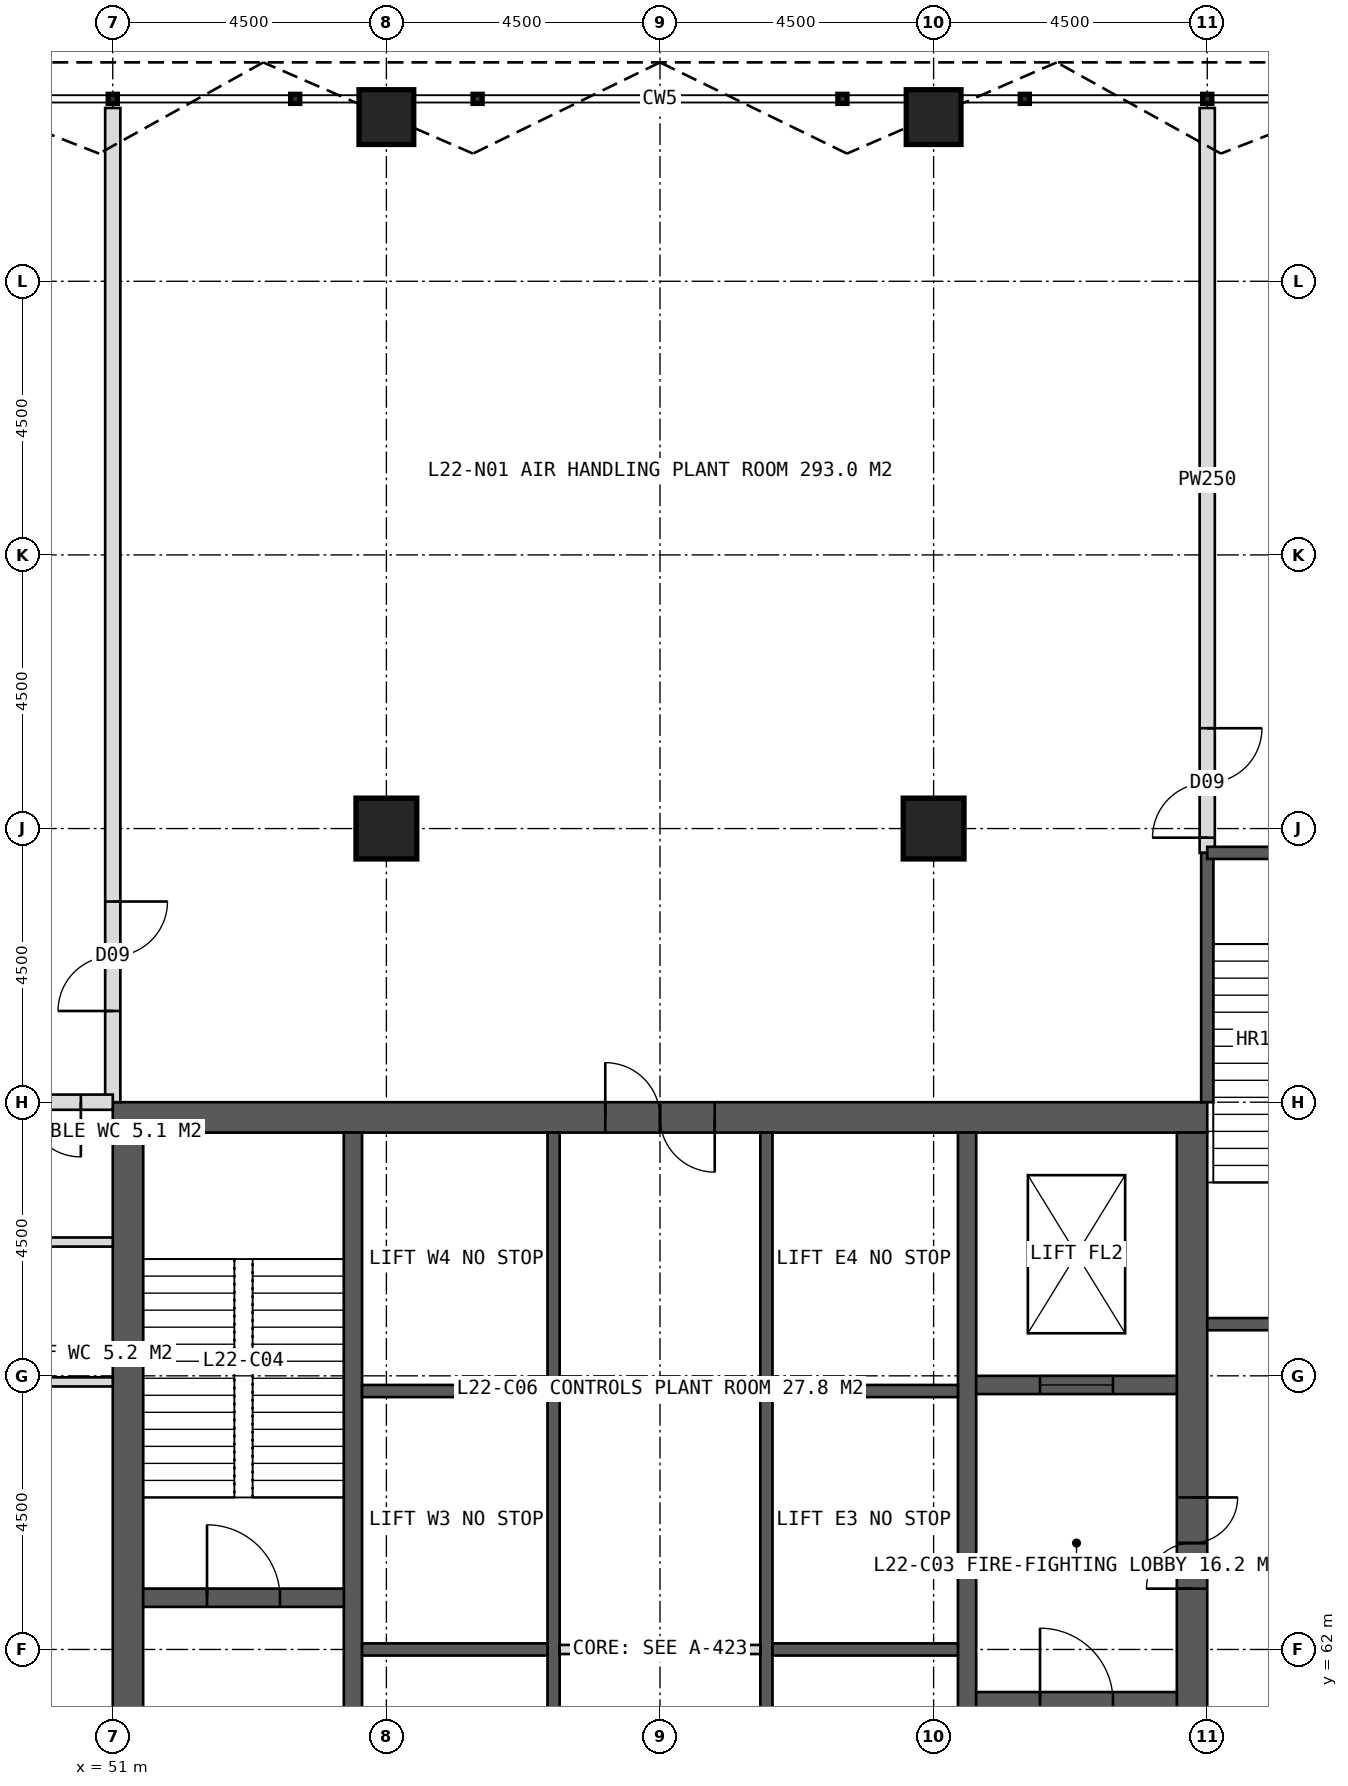
"""IFC4 building model, lengths in metres.
Left out: names, types, materials, properties, quantities, classifications, styles, units other than length and angle.
Written with IfcOpenShell. Run it as: python <this file> out.ifc"""

import sys

from ifc_helpers import new_model, si_unit, direction, frame, frame_2d, origin, origin_2d, place, context, subcontext, project, spatial, rectangle, hollow_rectangle, extrude, element, fill, save


model = new_model("IFC4")
c1 = context("Model", 3, precision=1e-05, world=origin(), true_north=direction((0.0, 1.0)))
c2 = subcontext(c1, "Body", "Model", "MODEL_VIEW")
j1 = project(units=[si_unit("LENGTHUNIT", "METRE"), si_unit("PLANEANGLEUNIT", "RADIAN")], contexts=[c1])
p1 = place(None, origin())
s1 = spatial("IfcSite", under=j1, at=p1, CompositionType="ELEMENT")
p2 = place(p1, origin())
s2 = spatial("IfcBuilding", under=s1, at=p2, CompositionType="ELEMENT")
p3 = place(p2, frame((0.0, 0.0, 95.0)))
s3 = spatial("IfcBuildingStorey", under=s2, at=p3, CompositionType="ELEMENT", Elevation=95.0)
p4 = place(p3, frame((51.0, 70.75, 0.0), z_axis=(0.0, 0.0, 1.0), x_axis=(1.0, 0.0, 0.0)))
e1 = element("IfcWall", 1, at=p4, inside=s3, PredefinedType="SHEAR", context=c2, shape_type="SweptSolid", body=[
    extrude(rectangle(XDim=18.0, YDim=0.5, at=frame_2d((9.0, 0.0))), origin(), (0.0, 0.0, 1.0), 5.0),
])
p5 = place(p4, frame((8.1, 0.0, 0.0)))
e2 = element("IfcOpeningElement", 2, at=p5, cuts=e1, PredefinedType="OPENING", context=c2, shape_type="SweptSolid", body=[
    extrude(rectangle(XDim=1.8, YDim=2.2, at=frame_2d((0.9, 1.1))), frame((0.0, 0.26, 0.0), z_axis=(0.0, -1.0, 0.0), x_axis=(1.0, 0.0, 0.0)), (0.0, 0.0, 1.0), 0.52),
])
p6 = place(p3, frame((51.25, 53.5, 0.0), z_axis=(0.0, 0.0, 1.0), x_axis=(0.0, 1.0, 0.0)))
e3 = element("IfcWall", 3, at=p6, inside=s3, PredefinedType="SHEAR", context=c2, shape_type="SweptSolid", body=[
    extrude(rectangle(XDim=17.0, YDim=0.5, at=frame_2d((8.5, 0.0))), origin(), (0.0, 0.0, 1.0), 5.0),
])
p7 = place(p6, frame((6.0, 0.0, 0.0)))
e4 = element("IfcOpeningElement", 4, at=p7, cuts=e3, PredefinedType="OPENING", context=c2, shape_type="SweptSolid", body=[
    extrude(rectangle(XDim=1.5, YDim=2.2, at=frame_2d((0.75, 1.1))), frame((0.0, 0.26, 0.0), z_axis=(0.0, -1.0, 0.0), x_axis=(1.0, 0.0, 0.0)), (0.0, 0.0, 1.0), 0.52),
])
p8 = place(p3, frame((68.75, 53.5, 0.0), z_axis=(0.0, 0.0, 1.0), x_axis=(0.0, 1.0, 0.0)))
e5 = element("IfcWall", 5, at=p8, inside=s3, PredefinedType="SHEAR", context=c2, shape_type="SweptSolid", body=[
    extrude(rectangle(XDim=17.0, YDim=0.5, at=frame_2d((8.5, 0.0))), origin(), (0.0, 0.0, 1.0), 5.0),
])
p9 = place(p8, frame((9.5, 0.0, 0.0)))
e6 = element("IfcOpeningElement", 6, at=p9, cuts=e5, PredefinedType="OPENING", context=c2, shape_type="SweptSolid", body=[
    extrude(rectangle(XDim=1.5, YDim=2.2, at=frame_2d((0.75, 1.1))), frame((0.0, 0.26, 0.0), z_axis=(0.0, -1.0, 0.0), x_axis=(1.0, 0.0, 0.0)), (0.0, 0.0, 1.0), 0.52),
])
for number, where, z_axis, x_axis in (
    (7, (54.95, 53.5, 0.0), (0.0, 0.0, 1.0), (0.0, 1.0, 0.0)),
    (8, (65.05, 53.5, 0.0), (0.0, 0.0, 1.0), (0.0, 1.0, 0.0)),
):
    element("IfcWall", number, at=place(p3, frame(where, z_axis=z_axis, x_axis=x_axis)), inside=s3, PredefinedType="SHEAR", context=c2, shape_type="SweptSolid", body=[
        extrude(rectangle(XDim=17.0, YDim=0.3, at=frame_2d((8.5, 0.0))), origin(), (0.0, 0.0, 1.0), 5.0),
    ])
for number, where, z_axis, x_axis in (
    (9, (58.25, 53.5, 0.0), (0.0, 0.0, 1.0), (0.0, 1.0, 0.0)),
    (10, (61.75, 53.5, 0.0), (0.0, 0.0, 1.0), (0.0, 1.0, 0.0)),
):
    element("IfcWall", number, at=place(p3, frame(where, z_axis=z_axis, x_axis=x_axis)), inside=s3, PredefinedType="SHEAR", context=c2, shape_type="SweptSolid", body=[
        extrude(rectangle(XDim=17.0, YDim=0.2, at=frame_2d((8.5, 0.0))), origin(), (0.0, 0.0, 1.0), 5.0),
    ])
for number, where, z_axis, x_axis in (
    (11, (55.1, 62.0, 0.0), (0.0, 0.0, 1.0), (1.0, 0.0, 0.0)),
    (12, (61.85, 62.0, 0.0), (0.0, 0.0, 1.0), (1.0, 0.0, 0.0)),
    (13, (55.1, 66.25, 0.0), (0.0, 0.0, 1.0), (1.0, 0.0, 0.0)),
    (14, (61.85, 66.25, 0.0), (0.0, 0.0, 1.0), (1.0, 0.0, 0.0)),
):
    element("IfcWall", number, at=place(p3, frame(where, z_axis=z_axis, x_axis=x_axis)), inside=s3, PredefinedType="SHEAR", context=c2, shape_type="SweptSolid", body=[
        extrude(rectangle(XDim=3.05, YDim=0.2, at=frame_2d((1.525, 0.0))), origin(), (0.0, 0.0, 1.0), 5.0),
    ])
p10 = place(p3, frame((51.5, 62.85, 0.0), z_axis=(0.0, 0.0, 1.0), x_axis=(1.0, 0.0, 0.0)))
e15 = element("IfcWall", 15, at=p10, inside=s3, PredefinedType="SHEAR", context=c2, shape_type="SweptSolid", body=[
    extrude(rectangle(XDim=3.3, YDim=0.3, at=frame_2d((1.65, 0.0))), origin(), (0.0, 0.0, 1.0), 5.0),
])
p11 = place(p10, frame((1.05, 0.0, 0.0)))
e16 = element("IfcOpeningElement", 16, at=p11, cuts=e15, PredefinedType="OPENING", context=c2, shape_type="SweptSolid", body=[
    extrude(rectangle(XDim=1.2, YDim=2.1, at=frame_2d((0.6, 1.05))), frame((0.0, 0.16, 0.0), z_axis=(0.0, -1.0, 0.0), x_axis=(1.0, 0.0, 0.0)), (0.0, 0.0, 1.0), 0.32),
])
p12 = place(p3, frame((65.2, 61.15, 0.0), z_axis=(0.0, 0.0, 1.0), x_axis=(1.0, 0.0, 0.0)))
e17 = element("IfcWall", 17, at=p12, inside=s3, PredefinedType="SHEAR", context=c2, shape_type="SweptSolid", body=[
    extrude(rectangle(XDim=3.3, YDim=0.3, at=frame_2d((1.65, 0.0))), origin(), (0.0, 0.0, 1.0), 5.0),
])
p13 = place(p12, frame((1.05, 0.0, 0.0)))
e18 = element("IfcOpeningElement", 18, at=p13, cuts=e17, PredefinedType="OPENING", context=c2, shape_type="SweptSolid", body=[
    extrude(rectangle(XDim=1.2, YDim=2.1, at=frame_2d((0.6, 1.05))), frame((0.0, 0.16, 0.0), z_axis=(0.0, -1.0, 0.0), x_axis=(1.0, 0.0, 0.0)), (0.0, 0.0, 1.0), 0.32),
])
p14 = place(p3, frame((65.2, 66.35, 0.0), z_axis=(0.0, 0.0, 1.0), x_axis=(1.0, 0.0, 0.0)))
e19 = element("IfcWall", 19, at=p14, inside=s3, PredefinedType="SHEAR", context=c2, shape_type="SweptSolid", body=[
    extrude(rectangle(XDim=3.3, YDim=0.3, at=frame_2d((1.65, 0.0))), origin(), (0.0, 0.0, 1.0), 5.0),
])
p15 = place(p14, frame((1.05, 0.0, 0.0)))
e20 = element("IfcOpeningElement", 20, at=p15, cuts=e19, PredefinedType="OPENING", context=c2, shape_type="SweptSolid", body=[
    extrude(rectangle(XDim=1.2, YDim=2.2, at=frame_2d((0.6, 1.1))), frame((0.0, 0.16, 0.0), z_axis=(0.0, -1.0, 0.0), x_axis=(1.0, 0.0, 0.0)), (0.0, 0.0, 1.0), 0.32),
])
for number, where, z_axis, x_axis in (
    (21, (55.5, 75.5, 0.0), (0.0, 0.0, 1.0), (1.0, 0.0, 0.0)),
    (22, (64.5, 75.5, 0.0), (0.0, 0.0, 1.0), (1.0, 0.0, 0.0)),
):
    element("IfcColumn", number, at=place(p3, frame(where, z_axis=z_axis, x_axis=x_axis)), inside=s3, PredefinedType="COLUMN", context=c2, shape_type="SweptSolid", body=[
        extrude(hollow_rectangle(XDim=1.0, YDim=1.0, WallThickness=0.1, at=origin_2d()), origin(), (0.0, 0.0, 1.0), 5.0),
    ])
for number, where, z_axis, x_axis in (
    (23, (55.5, 87.2, 0.0), (0.0, 0.0, 1.0), (1.0, 0.0, 0.0)),
    (24, (64.5, 87.2, 0.0), (0.0, 0.0, 1.0), (1.0, 0.0, 0.0)),
):
    element("IfcColumn", number, at=place(p3, frame(where, z_axis=z_axis, x_axis=x_axis)), inside=s3, PredefinedType="COLUMN", context=c2, shape_type="SweptSolid", body=[
        extrude(hollow_rectangle(XDim=0.9, YDim=0.9, WallThickness=0.08, at=origin_2d()), origin(), (0.0, 0.0, 1.0), 5.0),
    ])
p16 = place(p3, frame((69.0, 75.1, 0.0), z_axis=(0.0, 0.0, 1.0), x_axis=(0.0, 1.0, 0.0)))
e25 = element("IfcWall", 25, at=p16, inside=s3, PredefinedType="SOLIDWALL", context=c2, shape_type="SweptSolid", body=[
    extrude(rectangle(XDim=12.25, YDim=0.25, at=frame_2d((6.125, 0.0))), origin(), (0.0, 0.0, 1.0), 4.75),
])
p17 = place(p16, frame((0.25, 0.0, 0.0)))
e26 = element("IfcOpeningElement", 26, at=p17, cuts=e25, PredefinedType="OPENING", context=c2, shape_type="SweptSolid", body=[
    extrude(rectangle(XDim=1.8, YDim=2.2, at=frame_2d((0.9, 1.1))), frame((0.0, 0.135, 0.0), z_axis=(0.0, -1.0, 0.0), x_axis=(1.0, 0.0, 0.0)), (0.0, 0.0, 1.0), 0.27),
])
p18 = place(p3, frame((51.0, 71.0, 0.0), z_axis=(0.0, 0.0, 1.0), x_axis=(0.0, 1.0, 0.0)))
e27 = element("IfcWall", 27, at=p18, inside=s3, PredefinedType="SOLIDWALL", context=c2, shape_type="SweptSolid", body=[
    extrude(rectangle(XDim=16.35, YDim=0.25, at=frame_2d((8.175, 0.0))), origin(), (0.0, 0.0, 1.0), 4.75),
])
p19 = place(p18, frame((1.5, 0.0, 0.0)))
e28 = element("IfcOpeningElement", 28, at=p19, cuts=e27, PredefinedType="OPENING", context=c2, shape_type="SweptSolid", body=[
    extrude(rectangle(XDim=1.8, YDim=2.2, at=frame_2d((0.9, 1.1))), frame((0.0, 0.135, 0.0), z_axis=(0.0, -1.0, 0.0), x_axis=(1.0, 0.0, 0.0)), (0.0, 0.0, 1.0), 0.27),
])
p20 = place(p3, frame((51.0, 71.0, 0.0), z_axis=(0.0, 0.0, 1.0), x_axis=(-1.0, 0.0, 0.0)))
e29 = element("IfcWall", 29, at=p20, inside=s3, PredefinedType="SOLIDWALL", context=c2, shape_type="SweptSolid", body=[
    extrude(rectangle(XDim=16.35, YDim=0.25, at=frame_2d((8.175, 0.0))), origin(), (0.0, 0.0, 1.0), 4.75),
])
p21 = place(p20, frame((0.525, 0.0, 0.0)))
e30 = element("IfcOpeningElement", 30, at=p21, cuts=e29, PredefinedType="OPENING", context=c2, shape_type="SweptSolid", body=[
    extrude(rectangle(XDim=1.8, YDim=2.2, at=frame_2d((0.9, 1.1))), frame((0.0, 0.135, 0.0), z_axis=(0.0, -1.0, 0.0), x_axis=(1.0, 0.0, 0.0)), (0.0, 0.0, 1.0), 0.27),
])
p22 = place(p3, frame((51.0, 66.4, 0.0), z_axis=(0.0, 0.0, 1.0), x_axis=(-1.0, 0.0, 0.0)))
e31 = element("IfcWall", 31, at=p22, inside=s3, PredefinedType="PARTITIONING", context=c2, shape_type="SweptSolid", body=[
    extrude(rectangle(XDim=2.5, YDim=0.15, at=frame_2d((1.25, 0.0))), origin(), (0.0, 0.0, 1.0), 3.25),
])
p23 = place(p3, frame((51.0, 68.7, 0.0), z_axis=(0.0, 0.0, 1.0), x_axis=(-1.0, 0.0, 0.0)))
e32 = element("IfcWall", 32, at=p23, inside=s3, PredefinedType="PARTITIONING", context=c2, shape_type="SweptSolid", body=[
    extrude(rectangle(XDim=2.5, YDim=0.15, at=frame_2d((1.25, 0.0))), origin(), (0.0, 0.0, 1.0), 4.75),
])
p24 = place(p3, frame((58.35, 62.0, 0.0), z_axis=(0.0, 0.0, 1.0), x_axis=(1.0, 0.0, 0.0)))
e33 = element("IfcWall", 33, at=p24, inside=s3, PredefinedType="PARTITIONING", context=c2, shape_type="SweptSolid", body=[
    extrude(rectangle(XDim=3.3, YDim=0.15, at=frame_2d((1.65, 0.0))), origin(), (0.0, 0.0, 1.0), 4.75),
])
p25 = place(p3, frame((69.0, 71.0, 0.0), z_axis=(0.0, 0.0, 1.0), x_axis=(0.0, 1.0, 0.0)))
e34 = element("IfcWall", 34, at=p25, inside=s3, PredefinedType="SOLIDWALL", context=c2, shape_type="SweptSolid", body=[
    extrude(rectangle(XDim=4.1, YDim=0.2, at=frame_2d((2.05, 0.0))), origin(), (0.0, 0.0, 1.0), 4.75),
])
p26 = place(p3, frame((69.0, 67.35, 0.0), z_axis=(0.0, 0.0, 1.0), x_axis=(1.0, 0.0, 0.0)))
e35 = element("IfcWall", 35, at=p26, inside=s3, PredefinedType="SOLIDWALL", context=c2, shape_type="SweptSolid", body=[
    extrude(rectangle(XDim=3.5, YDim=0.2, at=frame_2d((1.75, 0.0))), origin(), (0.0, 0.0, 1.0), 4.75),
])
p27 = place(p3, frame((69.0, 75.1, 0.0), z_axis=(0.0, 0.0, 1.0), x_axis=(1.0, 0.0, 0.0)))
e36 = element("IfcWall", 36, at=p27, inside=s3, PredefinedType="SOLIDWALL", context=c2, shape_type="SweptSolid", body=[
    extrude(rectangle(XDim=3.5, YDim=0.2, at=frame_2d((1.75, 0.0))), origin(), (0.0, 0.0, 1.0), 4.75),
])
p28 = place(p27, frame((1.15, 0.0, 0.0)))
e37 = element("IfcOpeningElement", 37, at=p28, cuts=e36, PredefinedType="OPENING", context=c2, shape_type="SweptSolid", body=[
    extrude(rectangle(XDim=1.2, YDim=2.1, at=frame_2d((0.6, 1.05))), frame((0.0, 0.11, 0.0), z_axis=(0.0, -1.0, 0.0), x_axis=(1.0, 0.0, 0.0)), (0.0, 0.0, 1.0), 0.22),
])
p29 = place(p17, origin())
e38 = element("IfcDoor", 38, at=p29, inside=s3, OperationType="DOUBLE_DOOR_SINGLE_SWING", PredefinedType="DOOR", context=c2, shape_type="SweptSolid", body=[
    extrude(rectangle(XDim=1.8, YDim=2.2, at=frame_2d((0.9, 1.1))), frame((0.0, 0.025, 0.0), z_axis=(0.0, -1.0, 0.0), x_axis=(1.0, 0.0, 0.0)), (0.0, 0.0, 1.0), 0.05),
])
fill(e26, e38)
p30 = place(p19, origin())
e39 = element("IfcDoor", 39, at=p30, inside=s3, OperationType="DOUBLE_DOOR_SINGLE_SWING", PredefinedType="DOOR", context=c2, shape_type="SweptSolid", body=[
    extrude(rectangle(XDim=1.8, YDim=2.2, at=frame_2d((0.9, 1.1))), frame((0.0, 0.025, 0.0), z_axis=(0.0, -1.0, 0.0), x_axis=(1.0, 0.0, 0.0)), (0.0, 0.0, 1.0), 0.05),
])
fill(e28, e39)
p31 = place(p21, origin())
e40 = element("IfcDoor", 40, at=p31, inside=s3, OperationType="DOUBLE_DOOR_SINGLE_SWING", PredefinedType="DOOR", context=c2, shape_type="SweptSolid", body=[
    extrude(rectangle(XDim=1.8, YDim=2.2, at=frame_2d((0.9, 1.1))), frame((0.0, 0.025, 0.0), z_axis=(0.0, -1.0, 0.0), x_axis=(1.0, 0.0, 0.0)), (0.0, 0.0, 1.0), 0.05),
])
fill(e30, e40)
p32 = place(p9, origin())
e41 = element("IfcDoor", 41, at=p32, inside=s3, OperationType="DOUBLE_DOOR_SINGLE_SWING", PredefinedType="DOOR", context=c2, shape_type="SweptSolid", body=[
    extrude(rectangle(XDim=1.5, YDim=2.2, at=frame_2d((0.75, 1.1))), frame((0.0, 0.025, 0.0), z_axis=(0.0, -1.0, 0.0), x_axis=(1.0, 0.0, 0.0)), (0.0, 0.0, 1.0), 0.05),
])
fill(e6, e41)
p33 = place(p11, origin())
e42 = element("IfcDoor", 42, at=p33, inside=s3, OperationType="SINGLE_SWING_LEFT", PredefinedType="DOOR", context=c2, shape_type="SweptSolid", body=[
    extrude(rectangle(XDim=1.2, YDim=2.1, at=frame_2d((0.6, 1.05))), frame((0.0, 0.025, 0.0), z_axis=(0.0, -1.0, 0.0), x_axis=(1.0, 0.0, 0.0)), (0.0, 0.0, 1.0), 0.05),
])
fill(e16, e42)
p34 = place(p13, origin())
e43 = element("IfcDoor", 43, at=p34, inside=s3, OperationType="SINGLE_SWING_LEFT", PredefinedType="DOOR", context=c2, shape_type="SweptSolid", body=[
    extrude(rectangle(XDim=1.2, YDim=2.1, at=frame_2d((0.6, 1.05))), frame((0.0, 0.025, 0.0), z_axis=(0.0, -1.0, 0.0), x_axis=(1.0, 0.0, 0.0)), (0.0, 0.0, 1.0), 0.05),
])
fill(e18, e43)
p35 = place(p15, origin())
e44 = element("IfcDoor", 44, at=p35, inside=s3, OperationType="SLIDING_TO_LEFT", PredefinedType="DOOR", context=c2, shape_type="SweptSolid", body=[
    extrude(rectangle(XDim=1.2, YDim=2.2, at=frame_2d((0.6, 1.1))), frame((0.0, 0.025, 0.0), z_axis=(0.0, -1.0, 0.0), x_axis=(1.0, 0.0, 0.0)), (0.0, 0.0, 1.0), 0.05),
])
fill(e20, e44)
p36 = place(p5, origin())
e45 = element("IfcDoor", 45, at=p36, inside=s3, OperationType="DOUBLE_DOOR_SINGLE_SWING", PredefinedType="DOOR", context=c2, shape_type="SweptSolid", body=[
    extrude(rectangle(XDim=1.8, YDim=2.2, at=frame_2d((0.9, 1.1))), frame((0.0, 0.025, 0.0), z_axis=(0.0, -1.0, 0.0), x_axis=(1.0, 0.0, 0.0)), (0.0, 0.0, 1.0), 0.05),
])
fill(e2, e45)
save(model, sys.argv[1])
